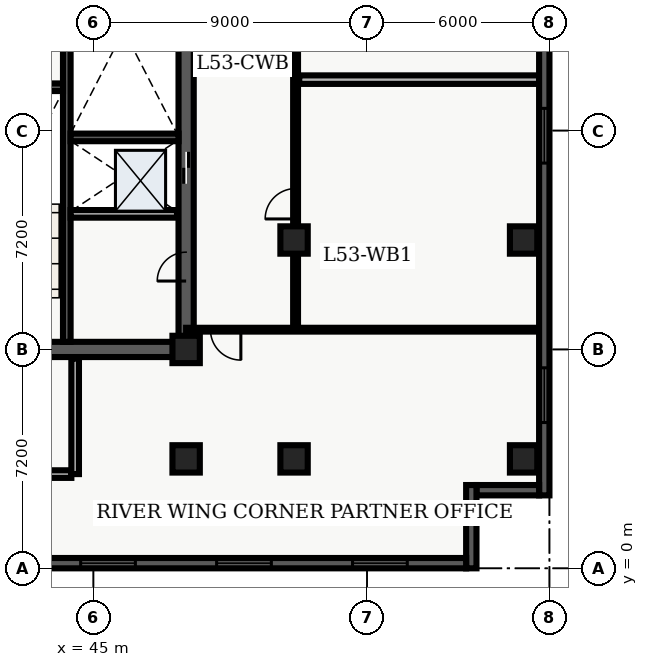
"""IFC4 building model, lengths in metres.
Left out: names, types, materials, properties, quantities, classifications, styles, units other than length and angle.
Written with IfcOpenShell. Run it as: python <this file> out.ifc"""

import sys

from ifc_helpers import new_model, entity, si_unit, converted_unit, direction, frame, origin_with_axes, origin_2d_with_axis, place, context, subcontext, project, spatial, polyline, rectangle, outline, extrude, element, fill, save


model = new_model("IFC4")
c1 = context("Model", 3, precision=1e-05, world=origin_with_axes(), true_north=direction((0.0, 1.0)))
c2 = subcontext(c1, "Body", "Model", "MODEL_VIEW")
j1 = project(units=[si_unit("LENGTHUNIT", "METRE"), converted_unit("PLANEANGLEUNIT", "DEGREE", entity("IfcPlaneAngleMeasure", 0.017), si_unit("PLANEANGLEUNIT", "RADIAN"), dimensions=[0, 0, 0, 0, 0, 0, 0])], contexts=[c1])
p1 = place(None, origin_with_axes())
s1 = spatial("IfcSite", under=j1, at=p1, CompositionType="ELEMENT")
p2 = place(p1, origin_with_axes())
s2 = spatial("IfcBuilding", under=s1, at=p2, CompositionType="ELEMENT")
p3 = place(p2, frame((0.0, 0.0, 216.0), z_axis=(0.0, 0.0, 1.0), x_axis=(1.0, 0.0, 0.0)))
s3 = spatial("IfcBuildingStorey", under=s2, at=p3, CompositionType="ELEMENT", Elevation=216.0)
p4 = place(p3, frame((40.2, 7.2, 0.0), z_axis=(0.0, 0.0, 1.0), x_axis=(1.0, 0.0, 0.0)))
e1 = element("IfcWall", 1, at=p4, inside=s3, PredefinedType="SHEAR", context=c2, shape_type="SweptSolid", body=[
    extrude(outline(polyline([(0.0, -0.25), (7.85, -0.25), (7.85, 0.25), (0.0, 0.25), (0.0, -0.25)])), origin_with_axes(), (0.0, 0.0, 1.0), 3.6),
])
p5 = place(p4, frame((2.175, 0.0, 0.0), z_axis=(0.0, 0.0, 1.0), x_axis=(1.0, 0.0, 0.0)))
e2 = element("IfcOpeningElement", 2, at=p5, cuts=e1, PredefinedType="OPENING", context=c2, shape_type="SweptSolid", body=[
    extrude(rectangle(XDim=1.05, YDim=0.52, at=origin_2d_with_axis()), origin_with_axes(), (0.0, 0.0, 1.0), 2.15),
])
p6 = place(p3, frame((48.05, 7.2, 0.0), z_axis=(0.0, 0.0, 1.0), x_axis=(0.0, 1.0, 0.0)))
e3 = element("IfcWall", 3, at=p6, inside=s3, PredefinedType="SHEAR", context=c2, shape_type="SweptSolid", body=[
    extrude(outline(polyline([(0.0, -0.25), (15.6, -0.25), (15.6, 0.25), (0.0, 0.25), (0.0, -0.25)])), origin_with_axes(), (0.0, 0.0, 1.0), 3.6),
])
p7 = place(p6, frame((5.975, 0.0, 0.0), z_axis=(0.0, 0.0, 1.0), x_axis=(1.0, 0.0, 0.0)))
e4 = element("IfcOpeningElement", 4, at=p7, cuts=e3, PredefinedType="OPENING", context=c2, shape_type="SweptSolid", body=[
    extrude(rectangle(XDim=1.05, YDim=0.52, at=origin_2d_with_axis()), origin_with_axes(), (0.0, 0.0, 1.0), 2.15),
])
p8 = place(p6, frame((2.725, 0.0, 0.0), z_axis=(0.0, 0.0, 1.0), x_axis=(1.0, 0.0, 0.0)))
e5 = element("IfcOpeningElement", 5, at=p8, cuts=e3, PredefinedType="OPENING", context=c2, shape_type="SweptSolid", body=[
    extrude(rectangle(XDim=0.95, YDim=0.52, at=origin_2d_with_axis()), origin_with_axes(), (0.0, 0.0, 1.0), 2.15),
])
p9 = place(p3, frame((44.125, 7.45, 0.0), z_axis=(0.0, 0.0, 1.0), x_axis=(0.0, 1.0, 0.0)))
e6 = element("IfcWall", 6, at=p9, inside=s3, PredefinedType="SHEAR", context=c2, shape_type="SweptSolid", body=[
    extrude(outline(polyline([(0.0, -0.125), (15.1, -0.125), (15.1, 0.125), (0.0, 0.125), (0.0, -0.125)])), origin_with_axes(), (0.0, 0.0, 1.0), 3.6),
])
for number, where, z_axis, x_axis in (
    (7, (40.45, 15.825, 0.0), (0.0, 0.0, 1.0), (1.0, 0.0, 0.0)),
    (8, (44.25, 14.175, 0.0), (0.0, 0.0, 1.0), (1.0, 0.0, 0.0)),
):
    element("IfcWall", number, at=place(p3, frame(where, z_axis=z_axis, x_axis=x_axis)), inside=s3, PredefinedType="SHEAR", context=c2, shape_type="SweptSolid", body=[
        extrude(outline(polyline([(0.0, -0.125), (3.55, -0.125), (3.55, 0.125), (0.0, 0.125), (0.0, -0.125)])), origin_with_axes(), (0.0, 0.0, 1.0), 3.6),
    ])
p10 = place(p3, frame((40.325, 3.1, 0.0), z_axis=(0.0, 0.0, 1.0), x_axis=(1.0, 0.0, 0.0)))
e9 = element("IfcWall", 9, at=p10, inside=s3, PredefinedType="SOLIDWALL", context=c2, shape_type="SweptSolid", body=[
    extrude(outline(polyline([(0.0, -0.125), (3.95, -0.125), (3.95, 0.125), (0.0, 0.125), (0.0, -0.125)])), origin_with_axes(), (0.0, 0.0, 1.0), 2.64),
])
p11 = place(p3, frame((44.4, 3.1, 0.0), z_axis=(0.0, 0.0, 1.0), x_axis=(0.0, 1.0, 0.0)))
e10 = element("IfcWall", 10, at=p11, inside=s3, PredefinedType="SOLIDWALL", context=c2, shape_type="SweptSolid", body=[
    extrude(outline(polyline([(0.0, -0.125), (3.8, -0.125), (3.8, 0.125), (0.0, 0.125), (0.0, -0.125)])), origin_with_axes(), (0.0, 0.0, 1.0), 2.64),
])
for number, where, z_axis, x_axis in (
    (11, (48.05, 3.6, 0.0), (0.0, 0.0, 1.0), (1.0, 0.0, 0.0)),
    (12, (48.05, 7.2, 0.0), (0.0, 0.0, 1.0), (1.0, 0.0, 0.0)),
    (13, (51.6, 3.6, 0.0), (0.0, 0.0, 1.0), (1.0, 0.0, 0.0)),
    (14, (51.6, 10.8, 0.0), (0.0, 0.0, 1.0), (1.0, 0.0, 0.0)),
    (15, (59.15, 3.6, 0.0), (0.0, 0.0, 1.0), (1.0, 0.0, 0.0)),
    (16, (59.15, 10.8, 0.0), (0.0, 0.0, 1.0), (1.0, 0.0, 0.0)),
):
    element("IfcColumn", number, at=place(p3, frame(where, z_axis=z_axis, x_axis=x_axis)), inside=s3, PredefinedType="COLUMN", context=c2, shape_type="SweptSolid", body=[
        extrude(rectangle(XDim=0.9, YDim=0.9, at=origin_2d_with_axis()), origin_with_axes(), (0.0, 0.0, 1.0), 3.9),
    ])
p12 = place(p3, frame((44.25, 11.66, 0.0), z_axis=(0.0, 0.0, 1.0), x_axis=(1.0, 0.0, 0.0)))
e17 = element("IfcWall", 17, at=p12, inside=s3, PredefinedType="SOLIDWALL", context=c2, shape_type="SweptSolid", body=[
    extrude(outline(polyline([(0.0, -0.125), (3.5, -0.125), (3.5, 0.125), (0.0, 0.125), (0.0, -0.125)])), origin_with_axes(), (0.0, 0.0, 1.0), 2.64),
])
p13 = place(p3, frame((51.65, 7.85, 0.0), z_axis=(0.0, 0.0, 1.0), x_axis=(0.0, 1.0, 0.0)))
e18 = element("IfcWall", 18, at=p13, inside=s3, PredefinedType="PARTITIONING", context=c2, shape_type="SweptSolid", body=[
    extrude(outline(polyline([(0.0, -0.08), (18.8, -0.08), (18.8, 0.08), (0.0, 0.08), (0.0, -0.08)])), origin_with_axes(), (0.0, 0.0, 1.0), 2.64),
])
p14 = place(p13, frame((4.143, 0.0, 0.0), z_axis=(0.0, 0.0, 1.0), x_axis=(1.0, 0.0, 0.0)))
e19 = element("IfcOpeningElement", 19, at=p14, cuts=e18, PredefinedType="OPENING", context=c2, shape_type="SweptSolid", body=[
    extrude(rectangle(XDim=1.0, YDim=0.18, at=origin_2d_with_axis()), origin_with_axes(), (0.0, 0.0, 1.0), 2.15),
])
p15 = place(p13, frame((13.482, 0.0, 0.0), z_axis=(0.0, 0.0, 1.0), x_axis=(1.0, 0.0, 0.0)))
e20 = element("IfcOpeningElement", 20, at=p15, cuts=e18, PredefinedType="OPENING", context=c2, shape_type="SweptSolid", body=[
    extrude(rectangle(XDim=1.0, YDim=0.18, at=origin_2d_with_axis()), origin_with_axes(), (0.0, 0.0, 1.0), 2.15),
])
p16 = place(p3, frame((59.665, 7.85, 0.0), z_axis=(0.0, 0.0, 1.0), x_axis=(-1.0, 0.0, 0.0)))
e21 = element("IfcWall", 21, at=p16, inside=s3, PredefinedType="PARTITIONING", context=c2, shape_type="SweptSolid", body=[
    extrude(outline(polyline([(0.0, -0.062), (11.615, -0.062), (11.615, 0.062), (0.0, 0.062), (0.0, -0.062)])), origin_with_axes(), (0.0, 0.0, 1.0), 2.64),
])
p17 = place(p16, frame((10.315, 0.0, 0.0), z_axis=(0.0, 0.0, 1.0), x_axis=(1.0, 0.0, 0.0)))
e22 = element("IfcOpeningElement", 22, at=p17, cuts=e21, PredefinedType="OPENING", context=c2, shape_type="SweptSolid", body=[
    extrude(rectangle(XDim=1.0, YDim=0.145, at=origin_2d_with_axis()), origin_with_axes(), (0.0, 0.0, 1.0), 2.15),
])
p18 = place(p3, frame((51.77, 16.075, 0.0), z_axis=(0.0, 0.0, 1.0), x_axis=(1.0, 0.0, 0.0)))
e23 = element("IfcWall", 23, at=p18, inside=s3, PredefinedType="PARTITIONING", context=c2, shape_type="SweptSolid", body=[
    extrude(outline(polyline([(0.0, -0.14), (7.895, -0.14), (7.895, 0.14), (0.0, 0.14), (0.0, -0.14)])), origin_with_axes(), (0.0, 0.0, 1.0), 2.64),
])
p19 = place(p3, frame((59.83, 26.06, 0.0), z_axis=(0.0, 0.0, 1.0), x_axis=(0.0, -1.0, 0.0)))
e24 = element("IfcWall", 24, at=p19, inside=s3, PredefinedType="SOLIDWALL", context=c2, shape_type="SweptSolid", body=[
    extrude(outline(polyline([(0.0, -0.17), (23.66, -0.17), (23.66, 0.17), (0.0, 0.17), (0.0, -0.17)])), origin_with_axes(), (0.0, 0.0, 1.0), 3.6),
])
p20 = place(p19, frame((3.696, 0.0, 0.45), z_axis=(0.0, 0.0, 1.0), x_axis=(1.0, 0.0, 0.0)))
e25 = element("IfcOpeningElement", 25, at=p20, cuts=e24, PredefinedType="OPENING", context=c2, shape_type="SweptSolid", body=[
    extrude(rectangle(XDim=1.8, YDim=0.36, at=origin_2d_with_axis()), origin_with_axes(), (0.0, 0.0, 1.0), 2.1),
])
p21 = place(p19, frame((11.83, 0.0, 0.45), z_axis=(0.0, 0.0, 1.0), x_axis=(1.0, 0.0, 0.0)))
e26 = element("IfcOpeningElement", 26, at=p21, cuts=e24, PredefinedType="OPENING", context=c2, shape_type="SweptSolid", body=[
    extrude(rectangle(XDim=1.8, YDim=0.36, at=origin_2d_with_axis()), origin_with_axes(), (0.0, 0.0, 1.0), 2.1),
])
p22 = place(p19, frame((20.364, 0.0, 0.45), z_axis=(0.0, 0.0, 1.0), x_axis=(1.0, 0.0, 0.0)))
e27 = element("IfcOpeningElement", 27, at=p22, cuts=e24, PredefinedType="OPENING", context=c2, shape_type="SweptSolid", body=[
    extrude(rectangle(XDim=1.8, YDim=0.36, at=origin_2d_with_axis()), origin_with_axes(), (0.0, 0.0, 1.0), 2.1),
])
p23 = place(p3, frame((59.66, 2.57, 0.0), z_axis=(0.0, 0.0, 1.0), x_axis=(-1.0, 0.0, 0.0)))
e28 = element("IfcWall", 28, at=p23, inside=s3, PredefinedType="SOLIDWALL", context=c2, shape_type="SweptSolid", body=[
    extrude(outline(polyline([(0.0, -0.17), (2.06, -0.17), (2.06, 0.17), (0.0, 0.17), (0.0, -0.17)])), origin_with_axes(), (0.0, 0.0, 1.0), 3.6),
])
p24 = place(p3, frame((57.43, 2.74, 0.0), z_axis=(0.0, 0.0, 1.0), x_axis=(0.0, -1.0, 0.0)))
e29 = element("IfcWall", 29, at=p24, inside=s3, PredefinedType="SOLIDWALL", context=c2, shape_type="SweptSolid", body=[
    extrude(outline(polyline([(0.0, -0.17), (2.74, -0.17), (2.74, 0.17), (0.0, 0.17), (0.0, -0.17)])), origin_with_axes(), (0.0, 0.0, 1.0), 3.6),
])
p25 = place(p3, frame((57.26, 0.17, 0.0), z_axis=(0.0, 0.0, 1.0), x_axis=(-1.0, 0.0, 0.0)))
e30 = element("IfcWall", 30, at=p25, inside=s3, PredefinedType="SOLIDWALL", context=c2, shape_type="SweptSolid", body=[
    extrude(outline(polyline([(0.0, -0.17), (54.86, -0.17), (54.86, 0.17), (0.0, 0.17), (0.0, -0.17)])), origin_with_axes(), (0.0, 0.0, 1.0), 3.6),
])
p26 = place(p25, frame((2.836, 0.0, 0.45), z_axis=(0.0, 0.0, 1.0), x_axis=(1.0, 0.0, 0.0)))
e31 = element("IfcOpeningElement", 31, at=p26, cuts=e30, PredefinedType="OPENING", context=c2, shape_type="SweptSolid", body=[
    extrude(rectangle(XDim=1.8, YDim=0.36, at=origin_2d_with_axis()), origin_with_axes(), (0.0, 0.0, 1.0), 2.1),
])
p27 = place(p25, frame((7.307, 0.0, 0.45), z_axis=(0.0, 0.0, 1.0), x_axis=(1.0, 0.0, 0.0)))
e32 = element("IfcOpeningElement", 32, at=p27, cuts=e30, PredefinedType="OPENING", context=c2, shape_type="SweptSolid", body=[
    extrude(rectangle(XDim=1.8, YDim=0.36, at=origin_2d_with_axis()), origin_with_axes(), (0.0, 0.0, 1.0), 2.1),
])
p28 = place(p25, frame((11.779, 0.0, 0.45), z_axis=(0.0, 0.0, 1.0), x_axis=(1.0, 0.0, 0.0)))
e33 = element("IfcOpeningElement", 33, at=p28, cuts=e30, PredefinedType="OPENING", context=c2, shape_type="SweptSolid", body=[
    extrude(rectangle(XDim=1.8, YDim=0.36, at=origin_2d_with_axis()), origin_with_axes(), (0.0, 0.0, 1.0), 2.1),
])
p29 = place(p25, frame((16.251, 0.0, 0.45), z_axis=(0.0, 0.0, 1.0), x_axis=(1.0, 0.0, 0.0)))
e34 = element("IfcOpeningElement", 34, at=p29, cuts=e30, PredefinedType="OPENING", context=c2, shape_type="SweptSolid", body=[
    extrude(rectangle(XDim=1.8, YDim=0.36, at=origin_2d_with_axis()), origin_with_axes(), (0.0, 0.0, 1.0), 2.1),
])
p30 = place(p25, frame((20.723, 0.0, 0.45), z_axis=(0.0, 0.0, 1.0), x_axis=(1.0, 0.0, 0.0)))
e35 = element("IfcOpeningElement", 35, at=p30, cuts=e30, PredefinedType="OPENING", context=c2, shape_type="SweptSolid", body=[
    extrude(rectangle(XDim=1.8, YDim=0.36, at=origin_2d_with_axis()), origin_with_axes(), (0.0, 0.0, 1.0), 2.1),
])
p31 = place(p25, frame((25.194, 0.0, 0.45), z_axis=(0.0, 0.0, 1.0), x_axis=(1.0, 0.0, 0.0)))
e36 = element("IfcOpeningElement", 36, at=p31, cuts=e30, PredefinedType="OPENING", context=c2, shape_type="SweptSolid", body=[
    extrude(rectangle(XDim=1.8, YDim=0.36, at=origin_2d_with_axis()), origin_with_axes(), (0.0, 0.0, 1.0), 2.1),
])
p32 = place(p25, frame((29.666, 0.0, 0.45), z_axis=(0.0, 0.0, 1.0), x_axis=(1.0, 0.0, 0.0)))
e37 = element("IfcOpeningElement", 37, at=p32, cuts=e30, PredefinedType="OPENING", context=c2, shape_type="SweptSolid", body=[
    extrude(rectangle(XDim=1.8, YDim=0.36, at=origin_2d_with_axis()), origin_with_axes(), (0.0, 0.0, 1.0), 2.1),
])
p33 = place(p25, frame((34.138, 0.0, 0.45), z_axis=(0.0, 0.0, 1.0), x_axis=(1.0, 0.0, 0.0)))
e38 = element("IfcOpeningElement", 38, at=p33, cuts=e30, PredefinedType="OPENING", context=c2, shape_type="SweptSolid", body=[
    extrude(rectangle(XDim=1.8, YDim=0.36, at=origin_2d_with_axis()), origin_with_axes(), (0.0, 0.0, 1.0), 2.1),
])
p34 = place(p25, frame((38.159, 0.0, 0.45), z_axis=(0.0, 0.0, 1.0), x_axis=(1.0, 0.0, 0.0)))
e39 = element("IfcOpeningElement", 39, at=p34, cuts=e30, PredefinedType="OPENING", context=c2, shape_type="SweptSolid", body=[
    extrude(rectangle(XDim=1.8, YDim=0.36, at=origin_2d_with_axis()), origin_with_axes(), (0.0, 0.0, 1.0), 2.1),
])
p35 = place(p25, frame((43.081, 0.0, 0.45), z_axis=(0.0, 0.0, 1.0), x_axis=(1.0, 0.0, 0.0)))
e40 = element("IfcOpeningElement", 40, at=p35, cuts=e30, PredefinedType="OPENING", context=c2, shape_type="SweptSolid", body=[
    extrude(rectangle(XDim=1.8, YDim=0.36, at=origin_2d_with_axis()), origin_with_axes(), (0.0, 0.0, 1.0), 2.1),
])
p36 = place(p25, frame((47.553, 0.0, 0.45), z_axis=(0.0, 0.0, 1.0), x_axis=(1.0, 0.0, 0.0)))
e41 = element("IfcOpeningElement", 41, at=p36, cuts=e30, PredefinedType="OPENING", context=c2, shape_type="SweptSolid", body=[
    extrude(rectangle(XDim=1.8, YDim=0.36, at=origin_2d_with_axis()), origin_with_axes(), (0.0, 0.0, 1.0), 2.1),
])
p37 = place(p25, frame((52.024, 0.0, 0.45), z_axis=(0.0, 0.0, 1.0), x_axis=(1.0, 0.0, 0.0)))
e42 = element("IfcOpeningElement", 42, at=p37, cuts=e30, PredefinedType="OPENING", context=c2, shape_type="SweptSolid", body=[
    extrude(rectangle(XDim=1.8, YDim=0.36, at=origin_2d_with_axis()), origin_with_axes(), (0.0, 0.0, 1.0), 2.1),
])
p38 = place(p6, frame((5.975, 0.0, 0.0), z_axis=(0.0, 0.0, 1.0), x_axis=(1.0, 0.0, 0.0)))
e43 = element("IfcDoor", 43, at=p38, inside=s3, OperationType="SLIDING_TO_LEFT", PredefinedType="DOOR", context=c2, shape_type="SweptSolid", body=[
    extrude(rectangle(XDim=1.05, YDim=0.09, at=origin_2d_with_axis()), origin_with_axes(), (0.0, 0.0, 1.0), 2.15),
])
fill(e4, e43)
p39 = place(p6, frame((2.725, 0.0, 0.0), z_axis=(0.0, 0.0, 1.0), x_axis=(1.0, 0.0, 0.0)))
e44 = element("IfcDoor", 44, at=p39, inside=s3, OperationType="SINGLE_SWING_LEFT", PredefinedType="DOOR", context=c2, shape_type="SweptSolid", body=[
    extrude(rectangle(XDim=0.95, YDim=0.09, at=origin_2d_with_axis()), origin_with_axes(), (0.0, 0.0, 1.0), 2.15),
])
fill(e5, e44)
p40 = place(p16, frame((10.315, 0.0, 0.0), z_axis=(0.0, 0.0, 1.0), x_axis=(1.0, 0.0, 0.0)))
e45 = element("IfcDoor", 45, at=p40, inside=s3, OperationType="SINGLE_SWING_LEFT", PredefinedType="DOOR", context=c2, shape_type="SweptSolid", body=[
    extrude(rectangle(XDim=1.0, YDim=0.075, at=origin_2d_with_axis()), origin_with_axes(), (0.0, 0.0, 1.0), 2.15),
])
fill(e22, e45)
p41 = place(p13, frame((4.143, 0.0, 0.0), z_axis=(0.0, 0.0, 1.0), x_axis=(1.0, 0.0, 0.0)))
e46 = element("IfcDoor", 46, at=p41, inside=s3, OperationType="SINGLE_SWING_LEFT", PredefinedType="DOOR", context=c2, shape_type="SweptSolid", body=[
    extrude(rectangle(XDim=1.0, YDim=0.09, at=origin_2d_with_axis()), origin_with_axes(), (0.0, 0.0, 1.0), 2.15),
])
fill(e19, e46)
p42 = place(p19, frame((11.83, 0.0, 0.45), z_axis=(0.0, 0.0, 1.0), x_axis=(1.0, 0.0, 0.0)))
e47 = element("IfcWindow", 47, at=p42, inside=s3, PredefinedType="WINDOW", context=c2, shape_type="SweptSolid", body=[
    extrude(rectangle(XDim=1.8, YDim=0.09, at=origin_2d_with_axis()), origin_with_axes(), (0.0, 0.0, 1.0), 2.1),
])
fill(e26, e47)
p43 = place(p19, frame((20.364, 0.0, 0.45), z_axis=(0.0, 0.0, 1.0), x_axis=(1.0, 0.0, 0.0)))
e48 = element("IfcWindow", 48, at=p43, inside=s3, PredefinedType="WINDOW", context=c2, shape_type="SweptSolid", body=[
    extrude(rectangle(XDim=1.8, YDim=0.09, at=origin_2d_with_axis()), origin_with_axes(), (0.0, 0.0, 1.0), 2.1),
])
fill(e27, e48)
p44 = place(p25, frame((2.836, 0.0, 0.45), z_axis=(0.0, 0.0, 1.0), x_axis=(1.0, 0.0, 0.0)))
e49 = element("IfcWindow", 49, at=p44, inside=s3, PredefinedType="WINDOW", context=c2, shape_type="SweptSolid", body=[
    extrude(rectangle(XDim=1.8, YDim=0.09, at=origin_2d_with_axis()), origin_with_axes(), (0.0, 0.0, 1.0), 2.1),
])
fill(e31, e49)
p45 = place(p25, frame((7.307, 0.0, 0.45), z_axis=(0.0, 0.0, 1.0), x_axis=(1.0, 0.0, 0.0)))
e50 = element("IfcWindow", 50, at=p45, inside=s3, PredefinedType="WINDOW", context=c2, shape_type="SweptSolid", body=[
    extrude(rectangle(XDim=1.8, YDim=0.09, at=origin_2d_with_axis()), origin_with_axes(), (0.0, 0.0, 1.0), 2.1),
])
fill(e32, e50)
p46 = place(p25, frame((11.779, 0.0, 0.45), z_axis=(0.0, 0.0, 1.0), x_axis=(1.0, 0.0, 0.0)))
e51 = element("IfcWindow", 51, at=p46, inside=s3, PredefinedType="WINDOW", context=c2, shape_type="SweptSolid", body=[
    extrude(rectangle(XDim=1.8, YDim=0.09, at=origin_2d_with_axis()), origin_with_axes(), (0.0, 0.0, 1.0), 2.1),
])
fill(e33, e51)
save(model, sys.argv[1])
